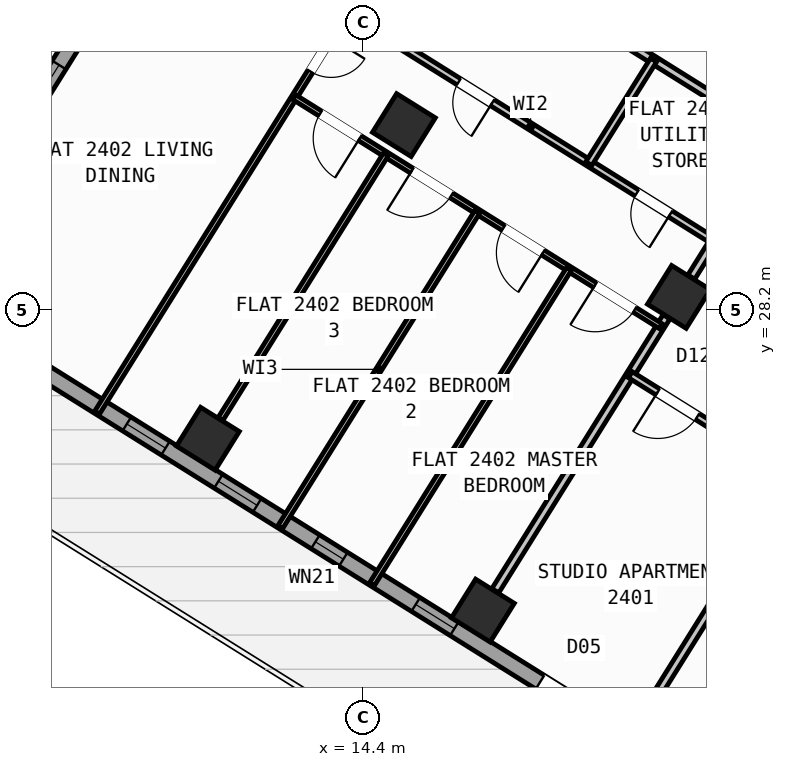
"""IFC4 building model, lengths in metres.
Left out: names, types, materials, properties, quantities, classifications, styles, units other than length and angle.
Written with IfcOpenShell. Run it as: python <this file> out.ifc"""

import sys

from ifc_helpers import new_model, si_unit, direction, frame, frame_2d, origin, origin_2d, place, context, subcontext, project, spatial, rectangle, hollow_rectangle, extrude, source, transform, mapped, element, fill, save


model = new_model("IFC4")
c1 = context("Model", 3, precision=1e-05, world=origin(), true_north=direction((0.0, 1.0)))
c2 = subcontext(c1, "Body", "Model", "MODEL_VIEW")
j1 = project(units=[si_unit("LENGTHUNIT", "METRE"), si_unit("PLANEANGLEUNIT", "RADIAN")], contexts=[c1])
p1 = place(None, origin())
s1 = spatial("IfcSite", under=j1, at=p1, CompositionType="ELEMENT")
p2 = place(p1, origin())
s2 = spatial("IfcBuilding", under=s1, at=p2, CompositionType="ELEMENT")
p3 = place(p2, frame((0.0, 0.0, 97.2)))
s3 = spatial("IfcBuildingStorey", under=s2, at=p3, CompositionType="ELEMENT", Elevation=97.2)
m1 = source(origin(), c2, "Body", "SweptSolid", [
    extrude(hollow_rectangle(XDim=0.9, YDim=0.9, WallThickness=0.036, at=origin_2d()), origin(), (0.0, 0.0, 1.0), 3.6),
])
for number, where, z_axis, x_axis in (
    (1, (20.632, 28.452, 0.0), (0.0, 0.0, 1.0), (-0.848, 0.53, 0.0)),
    (2, (16.764, 22.261, 0.0), (0.0, 0.0, 1.0), (-0.848, 0.53, 0.0)),
    (3, (15.205, 31.844, 0.0), (0.0, 0.0, 1.0), (-0.848, 0.53, 0.0)),
    (4, (11.336, 25.653, 0.0), (0.0, 0.0, 1.0), (-0.848, 0.53, 0.0)),
):
    element("IfcColumn", number, at=place(p3, frame(where, z_axis=z_axis, x_axis=x_axis)), inside=s3, PredefinedType="COLUMN", context=c2, shape_type="MappedRepresentation", body=[
        mapped(m1, transform((0.0, 0.0, 0.0), scale=1.0)),
    ])
p4 = place(p3, frame((31.76, 12.183, 0.0), z_axis=(0.0, 0.0, 1.0), x_axis=(-0.848047074256, 0.529920899612, 0.0)))
e5 = element("IfcWall", 5, at=p4, inside=s3, PredefinedType="STANDARD", context=c2, shape_type="SweptSolid", body=[
    extrude(rectangle(XDim=30.652, YDim=0.32, at=frame_2d((15.326, 0.0))), origin(), (0.0, 0.0, 1.0), 3.32),
])
p5 = place(p4, frame((15.153, 0.0, 0.0)))
e6 = element("IfcOpeningElement", 6, at=p5, cuts=e5, PredefinedType="OPENING", context=c2, shape_type="SweptSolid", body=[
    extrude(rectangle(XDim=1.2, YDim=2.15, at=frame_2d((0.6, 1.075))), frame((0.0, 0.17, 0.0), z_axis=(0.0, -1.0, 0.0), x_axis=(1.0, 0.0, 0.0)), (0.0, 0.0, 1.0), 0.34),
])
p6 = place(p4, frame((2.002, 0.0, 0.8)))
e7 = element("IfcOpeningElement", 7, at=p6, cuts=e5, PredefinedType="OPENING", context=c2, shape_type="SweptSolid", body=[
    extrude(rectangle(XDim=2.1, YDim=1.55, at=frame_2d((1.05, 0.775))), frame((0.0, 0.17, 0.0), z_axis=(0.0, -1.0, 0.0), x_axis=(1.0, 0.0, 0.0)), (0.0, 0.0, 1.0), 0.34),
])
p7 = place(p4, frame((7.206, 0.0, 0.8)))
e8 = element("IfcOpeningElement", 8, at=p7, cuts=e5, PredefinedType="OPENING", context=c2, shape_type="SweptSolid", body=[
    extrude(rectangle(XDim=2.1, YDim=1.55, at=frame_2d((1.05, 0.775))), frame((0.0, 0.17, 0.0), z_axis=(0.0, -1.0, 0.0), x_axis=(1.0, 0.0, 0.0)), (0.0, 0.0, 1.0), 0.34),
])
p8 = place(p4, frame((12.648, 0.0, 1.0)))
e9 = element("IfcOpeningElement", 9, at=p8, cuts=e5, PredefinedType="OPENING", context=c2, shape_type="SweptSolid", body=[
    extrude(rectangle(XDim=0.9, YDim=1.25, at=frame_2d((0.45, 0.625))), frame((0.0, 0.17, 0.0), z_axis=(0.0, -1.0, 0.0), x_axis=(1.0, 0.0, 0.0)), (0.0, 0.0, 1.0), 0.34),
])
p9 = place(p4, frame((27.974, 0.0, 0.95)))
e10 = element("IfcOpeningElement", 10, at=p9, cuts=e5, PredefinedType="OPENING", context=c2, shape_type="SweptSolid", body=[
    extrude(rectangle(XDim=1.2, YDim=1.4, at=frame_2d((0.6, 0.7))), frame((0.0, 0.17, 0.0), z_axis=(0.0, -1.0, 0.0), x_axis=(1.0, 0.0, 0.0)), (0.0, 0.0, 1.0), 0.34),
])
p10 = place(p4, frame((18.347, 0.0, 1.0)))
e11 = element("IfcOpeningElement", 11, at=p10, cuts=e5, PredefinedType="OPENING", context=c2, shape_type="SweptSolid", body=[
    extrude(rectangle(XDim=0.9, YDim=1.25, at=frame_2d((0.45, 0.625))), frame((0.0, 0.17, 0.0), z_axis=(0.0, -1.0, 0.0), x_axis=(1.0, 0.0, 0.0)), (0.0, 0.0, 1.0), 0.34),
])
p11 = place(p4, frame((20.931, 0.0, 1.0)))
e12 = element("IfcOpeningElement", 12, at=p11, cuts=e5, PredefinedType="OPENING", context=c2, shape_type="SweptSolid", body=[
    extrude(rectangle(XDim=0.65, YDim=1.15, at=frame_2d((0.325, 0.575))), frame((0.0, 0.17, 0.0), z_axis=(0.0, -1.0, 0.0), x_axis=(1.0, 0.0, 0.0)), (0.0, 0.0, 1.0), 0.34),
])
p12 = place(p4, frame((22.938, 0.0, 1.0)))
e13 = element("IfcOpeningElement", 13, at=p12, cuts=e5, PredefinedType="OPENING", context=c2, shape_type="SweptSolid", body=[
    extrude(rectangle(XDim=0.9, YDim=1.25, at=frame_2d((0.45, 0.625))), frame((0.0, 0.17, 0.0), z_axis=(0.0, -1.0, 0.0), x_axis=(1.0, 0.0, 0.0)), (0.0, 0.0, 1.0), 0.34),
])
p13 = place(p4, frame((25.069, 0.0, 1.0)))
e14 = element("IfcOpeningElement", 14, at=p13, cuts=e5, PredefinedType="OPENING", context=c2, shape_type="SweptSolid", body=[
    extrude(rectangle(XDim=0.9, YDim=1.25, at=frame_2d((0.45, 0.625))), frame((0.0, 0.17, 0.0), z_axis=(0.0, -1.0, 0.0), x_axis=(1.0, 0.0, 0.0)), (0.0, 0.0, 1.0), 0.34),
])
p14 = place(p3, frame((5.7, 28.71, 0.0), z_axis=(0.0, 0.0, 1.0), x_axis=(0.529923711467, 0.8480453172, 0.0)))
e15 = element("IfcWall", 15, at=p14, inside=s3, PredefinedType="STANDARD", context=c2, shape_type="SweptSolid", body=[
    extrude(rectangle(XDim=21.587, YDim=0.32, at=frame_2d((10.794, 0.0))), origin(), (0.0, 0.0, 1.0), 2.745),
])
p15 = place(p14, frame((2.994, 0.0, 0.8)))
e16 = element("IfcOpeningElement", 16, at=p15, cuts=e15, PredefinedType="OPENING", context=c2, shape_type="SweptSolid", body=[
    extrude(rectangle(XDim=2.1, YDim=1.55, at=frame_2d((1.05, 0.775))), frame((0.0, 0.17, 0.0), z_axis=(0.0, -1.0, 0.0), x_axis=(1.0, 0.0, 0.0)), (0.0, 0.0, 1.0), 0.34),
])
p16 = place(p14, frame((9.739, 0.0, 1.0)))
e17 = element("IfcOpeningElement", 17, at=p16, cuts=e15, PredefinedType="OPENING", context=c2, shape_type="SweptSolid", body=[
    extrude(rectangle(XDim=0.9, YDim=1.25, at=frame_2d((0.45, 0.625))), frame((0.0, 0.17, 0.0), z_axis=(0.0, -1.0, 0.0), x_axis=(1.0, 0.0, 0.0)), (0.0, 0.0, 1.0), 0.34),
])
p17 = place(p14, frame((18.639, 0.0, 0.85)))
e18 = element("IfcOpeningElement", 18, at=p17, cuts=e15, PredefinedType="OPENING", context=c2, shape_type="SweptSolid", body=[
    extrude(rectangle(XDim=1.5, YDim=1.5, at=frame_2d((0.75, 0.75))), frame((0.0, 0.17, 0.0), z_axis=(0.0, -1.0, 0.0), x_axis=(1.0, 0.0, 0.0)), (0.0, 0.0, 1.0), 0.34),
])
p18 = place(p3, frame((17.424, 47.083, 0.0), z_axis=(0.0, 0.0, 1.0), x_axis=(0.848049927979, -0.529916332693, 0.0)))
e19 = element("IfcWall", 19, at=p18, inside=s3, PredefinedType="STANDARD", context=c2, shape_type="SweptSolid", body=[
    extrude(rectangle(XDim=29.223, YDim=0.32, at=frame_2d((14.612, 0.0))), origin(), (0.0, 0.0, 1.0), 3.32),
])
p19 = place(p18, frame((3.745, 0.0, 0.0)))
e20 = element("IfcOpeningElement", 20, at=p19, cuts=e19, PredefinedType="OPENING", context=c2, shape_type="SweptSolid", body=[
    extrude(rectangle(XDim=1.05, YDim=2.15, at=frame_2d((0.525, 1.075))), frame((0.0, 0.17, 0.0), z_axis=(0.0, -1.0, 0.0), x_axis=(1.0, 0.0, 0.0)), (0.0, 0.0, 1.0), 0.34),
])
p20 = place(p18, frame((0.699, 0.0, 0.95)))
e21 = element("IfcOpeningElement", 21, at=p20, cuts=e19, PredefinedType="OPENING", context=c2, shape_type="SweptSolid", body=[
    extrude(rectangle(XDim=1.2, YDim=1.4, at=frame_2d((0.6, 0.7))), frame((0.0, 0.17, 0.0), z_axis=(0.0, -1.0, 0.0), x_axis=(1.0, 0.0, 0.0)), (0.0, 0.0, 1.0), 0.34),
])
p21 = place(p18, frame((6.951, 0.0, 1.0)))
e22 = element("IfcOpeningElement", 22, at=p21, cuts=e19, PredefinedType="OPENING", context=c2, shape_type="SweptSolid", body=[
    extrude(rectangle(XDim=0.9, YDim=1.25, at=frame_2d((0.45, 0.625))), frame((0.0, 0.17, 0.0), z_axis=(0.0, -1.0, 0.0), x_axis=(1.0, 0.0, 0.0)), (0.0, 0.0, 1.0), 0.34),
])
p22 = place(p18, frame((9.841, 0.0, 0.85)))
e23 = element("IfcOpeningElement", 23, at=p22, cuts=e19, PredefinedType="OPENING", context=c2, shape_type="SweptSolid", body=[
    extrude(rectangle(XDim=1.5, YDim=1.5, at=frame_2d((0.75, 0.75))), frame((0.0, 0.17, 0.0), z_axis=(0.0, -1.0, 0.0), x_axis=(1.0, 0.0, 0.0)), (0.0, 0.0, 1.0), 0.34),
])
p23 = place(p18, frame((13.889, 0.0, 0.95)))
e24 = element("IfcOpeningElement", 24, at=p23, cuts=e19, PredefinedType="OPENING", context=c2, shape_type="SweptSolid", body=[
    extrude(rectangle(XDim=1.2, YDim=1.4, at=frame_2d((0.6, 0.7))), frame((0.0, 0.17, 0.0), z_axis=(0.0, -1.0, 0.0), x_axis=(1.0, 0.0, 0.0)), (0.0, 0.0, 1.0), 0.34),
])
p24 = place(p18, frame((17.254, 0.0, 1.0)))
e25 = element("IfcOpeningElement", 25, at=p24, cuts=e19, PredefinedType="OPENING", context=c2, shape_type="SweptSolid", body=[
    extrude(rectangle(XDim=0.9, YDim=1.25, at=frame_2d((0.45, 0.625))), frame((0.0, 0.17, 0.0), z_axis=(0.0, -1.0, 0.0), x_axis=(1.0, 0.0, 0.0)), (0.0, 0.0, 1.0), 0.34),
])
p25 = place(p18, frame((20.764, 0.0, 0.8)))
e26 = element("IfcOpeningElement", 26, at=p25, cuts=e19, PredefinedType="OPENING", context=c2, shape_type="SweptSolid", body=[
    extrude(rectangle(XDim=2.1, YDim=1.55, at=frame_2d((1.05, 0.775))), frame((0.0, 0.17, 0.0), z_axis=(0.0, -1.0, 0.0), x_axis=(1.0, 0.0, 0.0)), (0.0, 0.0, 1.0), 0.34),
])
p26 = place(p18, frame((25.403, 0.0, 0.8)))
e27 = element("IfcOpeningElement", 27, at=p26, cuts=e19, PredefinedType="OPENING", context=c2, shape_type="SweptSolid", body=[
    extrude(rectangle(XDim=2.1, YDim=1.55, at=frame_2d((1.05, 0.775))), frame((0.0, 0.17, 0.0), z_axis=(0.0, -1.0, 0.0), x_axis=(1.0, 0.0, 0.0)), (0.0, 0.0, 1.0), 0.34),
])
p27 = place(p3, frame((25.807, 29.582, 0.0), z_axis=(0.0, 0.0, 1.0), x_axis=(-0.529920357077, -0.848047413271, 0.0)))
e28 = element("IfcWall", 28, at=p27, inside=s3, PredefinedType="PARTITIONING", context=c2, shape_type="SweptSolid", body=[
    extrude(rectangle(XDim=11.45, YDim=0.16, at=frame_2d((5.725, 0.0))), origin(), (0.0, 0.0, 1.0), 3.31),
])
p28 = place(p3, frame((26.973, 31.447, 0.0), z_axis=(0.0, 0.0, 1.0), x_axis=(-0.848048310262, 0.529918921593, 0.0)))
e29 = element("IfcWall", 29, at=p28, inside=s3, PredefinedType="PARTITIONING", context=c2, shape_type="SweptSolid", body=[
    extrude(rectangle(XDim=16.73, YDim=0.16, at=frame_2d((8.365, 0.0))), origin(), (0.0, 0.0, 1.0), 3.31),
])
p29 = place(p28, frame((2.22, 0.0, 0.0)))
e30 = element("IfcOpeningElement", 30, at=p29, cuts=e29, PredefinedType="OPENING", context=c2, shape_type="SweptSolid", body=[
    extrude(rectangle(XDim=0.86, YDim=2.05, at=frame_2d((0.43, 1.025))), frame((0.0, 0.09, 0.0), z_axis=(0.0, -1.0, 0.0), x_axis=(1.0, 0.0, 0.0)), (0.0, 0.0, 1.0), 0.18),
])
p30 = place(p28, frame((5.28, 0.0, 0.0)))
e31 = element("IfcOpeningElement", 31, at=p30, cuts=e29, PredefinedType="OPENING", context=c2, shape_type="SweptSolid", body=[
    extrude(rectangle(XDim=1.0, YDim=2.1, at=frame_2d((0.5, 1.05))), frame((0.0, 0.09, 0.0), z_axis=(0.0, -1.0, 0.0), x_axis=(1.0, 0.0, 0.0)), (0.0, 0.0, 1.0), 0.18),
])
p31 = place(p3, frame((25.807, 29.582, 0.0), z_axis=(0.0, 0.0, 1.0), x_axis=(-0.848052408131, 0.529912363569, 0.0)))
e32 = element("IfcWall", 32, at=p31, inside=s3, PredefinedType="PARTITIONING", context=c2, shape_type="SweptSolid", body=[
    extrude(rectangle(XDim=16.73, YDim=0.16, at=frame_2d((8.365, 0.0))), origin(), (0.0, 0.0, 1.0), 3.31),
])
p32 = place(p31, frame((2.22, 0.0, 0.0)))
e33 = element("IfcOpeningElement", 33, at=p32, cuts=e32, PredefinedType="OPENING", context=c2, shape_type="SweptSolid", body=[
    extrude(rectangle(XDim=0.86, YDim=2.05, at=frame_2d((0.43, 1.025))), frame((0.0, 0.09, 0.0), z_axis=(0.0, -1.0, 0.0), x_axis=(1.0, 0.0, 0.0)), (0.0, 0.0, 1.0), 0.18),
])
p33 = place(p31, frame((14.013, 0.0, 0.0)))
e34 = element("IfcOpeningElement", 34, at=p33, cuts=e32, PredefinedType="OPENING", context=c2, shape_type="SweptSolid", body=[
    extrude(rectangle(XDim=1.0, YDim=2.1, at=frame_2d((0.5, 1.05))), frame((0.0, 0.09, 0.0), z_axis=(0.0, -1.0, 0.0), x_axis=(1.0, 0.0, 0.0)), (0.0, 0.0, 1.0), 0.18),
])
p34 = place(p3, frame((22.593, 31.59, 0.0), z_axis=(0.0, 0.0, 1.0), x_axis=(-0.529924383291, -0.848044897393, 0.0)))
e35 = element("IfcWall", 35, at=p34, inside=s3, PredefinedType="PARTITIONING", context=c2, shape_type="SweptSolid", body=[
    extrude(rectangle(XDim=3.238, YDim=0.16, at=frame_2d((1.619, 0.0))), origin(), (0.0, 0.0, 1.0), 2.745),
])
p35 = place(p3, frame((20.387, 28.06, 0.0), z_axis=(0.0, 0.0, 1.0), x_axis=(-0.529902564924, -0.848058530814, 0.0)))
e36 = element("IfcWall", 36, at=p35, inside=s3, PredefinedType="PARTITIONING", context=c2, shape_type="SweptSolid", body=[
    extrude(rectangle(XDim=6.376, YDim=0.16, at=frame_2d((3.188, 0.0))), origin(), (0.0, 0.0, 1.0), 2.745),
])
p36 = place(p3, frame((22.887, 24.909, 0.0), z_axis=(0.0, 0.0, 1.0), x_axis=(-0.84803087207, 0.529946827537, 0.0)))
e37 = element("IfcWall", 37, at=p36, inside=s3, PredefinedType="PLUMBINGWALL", context=c2, shape_type="SweptSolid", body=[
    extrude(rectangle(XDim=3.79, YDim=0.14, at=frame_2d((1.895, 0.0))), origin(), (0.0, 0.0, 1.0), 3.31),
])
p37 = place(p36, frame((2.23, 0.0, 0.0)))
e38 = element("IfcOpeningElement", 38, at=p37, cuts=e37, PredefinedType="OPENING", context=c2, shape_type="SweptSolid", body=[
    extrude(rectangle(XDim=0.92, YDim=2.08, at=frame_2d((0.46, 1.04))), frame((0.0, 0.08, 0.0), z_axis=(0.0, -1.0, 0.0), x_axis=(1.0, 0.0, 0.0)), (0.0, 0.0, 1.0), 0.16),
])
p38 = place(p3, frame((15.361, 36.108, 0.0), z_axis=(0.0, 0.0, 1.0), x_axis=(-0.529912802348, -0.848052133956, 0.0)))
e39 = element("IfcWall", 39, at=p38, inside=s3, PredefinedType="PARTITIONING", context=c2, shape_type="SweptSolid", body=[
    extrude(rectangle(XDim=11.72, YDim=0.11, at=frame_2d((5.86, 0.0))), origin(), (0.0, 0.0, 1.0), 2.935),
])
p39 = place(p38, frame((3.0, 0.0, 0.0)))
e40 = element("IfcOpeningElement", 40, at=p39, cuts=e39, PredefinedType="OPENING", context=c2, shape_type="SweptSolid", body=[
    extrude(rectangle(XDim=0.78, YDim=2.05, at=frame_2d((0.39, 1.025))), frame((0.0, 0.065, 0.0), z_axis=(0.0, -1.0, 0.0), x_axis=(1.0, 0.0, 0.0)), (0.0, 0.0, 1.0), 0.13),
])
p40 = place(p3, frame((21.321, 29.554, 0.0), z_axis=(0.0, 0.0, 1.0), x_axis=(-0.84803529765, 0.529939745575, 0.0)))
e41 = element("IfcWall", 41, at=p40, inside=s3, PredefinedType="PLUMBINGWALL", context=c2, shape_type="SweptSolid", body=[
    extrude(rectangle(XDim=8.527, YDim=0.14, at=frame_2d((4.264, 0.0))), origin(), (0.0, 0.0, 1.0), 3.31),
])
p41 = place(p40, frame((5.155, 0.0, 0.0)))
e42 = element("IfcOpeningElement", 42, at=p41, cuts=e41, PredefinedType="OPENING", context=c2, shape_type="SweptSolid", body=[
    extrude(rectangle(XDim=0.78, YDim=2.05, at=frame_2d((0.39, 1.025))), frame((0.0, 0.08, 0.0), z_axis=(0.0, -1.0, 0.0), x_axis=(1.0, 0.0, 0.0)), (0.0, 0.0, 1.0), 0.16),
])
p42 = place(p40, frame((1.011, 0.0, 0.0)))
e43 = element("IfcOpeningElement", 43, at=p42, cuts=e41, PredefinedType="OPENING", context=c2, shape_type="SweptSolid", body=[
    extrude(rectangle(XDim=0.78, YDim=2.05, at=frame_2d((0.39, 1.025))), frame((0.0, 0.08, 0.0), z_axis=(0.0, -1.0, 0.0), x_axis=(1.0, 0.0, 0.0)), (0.0, 0.0, 1.0), 0.16),
])
p43 = place(p3, frame((20.132, 33.128, 0.0), z_axis=(0.0, 0.0, 1.0), x_axis=(-0.529935194983, -0.848038141311, 0.0)))
e44 = element("IfcWall", 44, at=p43, inside=s3, PredefinedType="PLUMBINGWALL", context=c2, shape_type="SweptSolid", body=[
    extrude(rectangle(XDim=2.41, YDim=0.14, at=frame_2d((1.205, 0.0))), origin(), (0.0, 0.0, 1.0), 3.31),
])
p44 = place(p3, frame((20.272, 27.875, 0.0), z_axis=(0.0, 0.0, 1.0), x_axis=(-0.848056204746, 0.529906287557, 0.0)))
e45 = element("IfcWall", 45, at=p44, inside=s3, PredefinedType="PARTITIONING", context=c2, shape_type="SweptSolid", body=[
    extrude(rectangle(XDim=8.527, YDim=0.11, at=frame_2d((4.264, 0.0))), origin(), (0.0, 0.0, 1.0), 3.31),
])
p45 = place(p44, frame((0.606, 0.0, 0.0)))
e46 = element("IfcOpeningElement", 46, at=p45, cuts=e45, PredefinedType="OPENING", context=c2, shape_type="SweptSolid", body=[
    extrude(rectangle(XDim=0.92, YDim=2.08, at=frame_2d((0.46, 1.04))), frame((0.0, 0.065, 0.0), z_axis=(0.0, -1.0, 0.0), x_axis=(1.0, 0.0, 0.0)), (0.0, 0.0, 1.0), 0.13),
])
p46 = place(p44, frame((2.738, 0.0, 0.0)))
e47 = element("IfcOpeningElement", 47, at=p46, cuts=e45, PredefinedType="OPENING", context=c2, shape_type="SweptSolid", body=[
    extrude(rectangle(XDim=0.92, YDim=2.08, at=frame_2d((0.46, 1.04))), frame((0.0, 0.065, 0.0), z_axis=(0.0, -1.0, 0.0), x_axis=(1.0, 0.0, 0.0)), (0.0, 0.0, 1.0), 0.13),
])
p47 = place(p44, frame((4.869, 0.0, 0.0)))
e48 = element("IfcOpeningElement", 48, at=p47, cuts=e45, PredefinedType="OPENING", context=c2, shape_type="SweptSolid", body=[
    extrude(rectangle(XDim=0.92, YDim=2.08, at=frame_2d((0.46, 1.04))), frame((0.0, 0.065, 0.0), z_axis=(0.0, -1.0, 0.0), x_axis=(1.0, 0.0, 0.0)), (0.0, 0.0, 1.0), 0.13),
])
p48 = place(p44, frame((7.001, 0.0, 0.0)))
e49 = element("IfcOpeningElement", 49, at=p48, cuts=e45, PredefinedType="OPENING", context=c2, shape_type="SweptSolid", body=[
    extrude(rectangle(XDim=0.92, YDim=2.08, at=frame_2d((0.46, 1.04))), frame((0.0, 0.065, 0.0), z_axis=(0.0, -1.0, 0.0), x_axis=(1.0, 0.0, 0.0)), (0.0, 0.0, 1.0), 0.13),
])
for number, where, z_axis, x_axis in (
    (50, (18.464, 29.005, 0.0), (0.0, 0.0, 1.0), (-0.53, -0.848, 0.0)),
    (51, (16.656, 30.135, 0.0), (0.0, 0.0, 1.0), (-0.53, -0.848, 0.0)),
):
    element("IfcWall", number, at=place(p3, frame(where, z_axis=z_axis, x_axis=x_axis)), inside=s3, PredefinedType="PARTITIONING", context=c2, shape_type="SweptSolid", body=[
        extrude(rectangle(XDim=7.34, YDim=0.11, at=frame_2d((3.67, 0.0))), origin(), (0.0, 0.0, 1.0), 2.935),
    ])
p49 = place(p3, frame((14.848, 31.264, 0.0), z_axis=(0.0, 0.0, 1.0), x_axis=(-0.529920534869, -0.848047302174, 0.0)))
e52 = element("IfcWall", 52, at=p49, inside=s3, PredefinedType="PARTITIONING", context=c2, shape_type="SweptSolid", body=[
    extrude(rectangle(XDim=6.158, YDim=0.11, at=frame_2d((3.079, 0.0))), origin(), (0.0, 0.0, 1.0), 2.745),
])
m2 = source(origin(), c2, "Body", "SweptSolid", [
    extrude(rectangle(XDim=1.2, YDim=2.15, at=frame_2d((0.6, 1.075))), frame((0.0, 0.025, 0.0), z_axis=(0.0, -1.0, 0.0), x_axis=(1.0, 0.0, 0.0)), (0.0, 0.0, 1.0), 0.05),
])
p50 = place(p5, origin())
e53 = element("IfcDoor", 53, at=p50, inside=s3, OperationType="SINGLE_SWING_LEFT", PredefinedType="DOOR", context=c2, shape_type="MappedRepresentation", body=[
    mapped(m2, transform((0.0, 0.0, 0.0), scale=1.0)),
])
fill(e6, e53)
m3 = source(origin(), c2, "Body", "SweptSolid", [
    extrude(rectangle(XDim=2.1, YDim=1.55, at=frame_2d((1.05, 0.775))), frame((0.0, 0.03, 0.0), z_axis=(0.0, -1.0, 0.0), x_axis=(1.0, 0.0, 0.0)), (0.0, 0.0, 1.0), 0.06),
])
p51 = place(p15, origin())
e54 = element("IfcWindow", 54, at=p51, inside=s3, PartitioningType="SINGLE_PANEL", PredefinedType="WINDOW", context=c2, shape_type="MappedRepresentation", body=[
    mapped(m3, transform((0.0, 0.0, 0.0), scale=1.0)),
])
fill(e16, e54)
m4 = source(origin(), c2, "Body", "SweptSolid", [
    extrude(rectangle(XDim=0.9, YDim=1.25, at=frame_2d((0.45, 0.625))), frame((0.0, 0.03, 0.0), z_axis=(0.0, -1.0, 0.0), x_axis=(1.0, 0.0, 0.0)), (0.0, 0.0, 1.0), 0.06),
])
p52 = place(p10, origin())
e55 = element("IfcWindow", 55, at=p52, inside=s3, PartitioningType="SINGLE_PANEL", PredefinedType="WINDOW", context=c2, shape_type="MappedRepresentation", body=[
    mapped(m4, transform((0.0, 0.0, 0.0), scale=1.0)),
])
fill(e11, e55)
m5 = source(origin(), c2, "Body", "SweptSolid", [
    extrude(rectangle(XDim=0.65, YDim=1.15, at=frame_2d((0.325, 0.575))), frame((0.0, 0.03, 0.0), z_axis=(0.0, -1.0, 0.0), x_axis=(1.0, 0.0, 0.0)), (0.0, 0.0, 1.0), 0.06),
])
p53 = place(p11, origin())
e56 = element("IfcWindow", 56, at=p53, inside=s3, PartitioningType="SINGLE_PANEL", PredefinedType="WINDOW", context=c2, shape_type="MappedRepresentation", body=[
    mapped(m5, transform((0.0, 0.0, 0.0), scale=1.0)),
])
fill(e12, e56)
p54 = place(p12, origin())
e57 = element("IfcWindow", 57, at=p54, inside=s3, PartitioningType="SINGLE_PANEL", PredefinedType="WINDOW", context=c2, shape_type="MappedRepresentation", body=[
    mapped(m4, transform((0.0, 0.0, 0.0), scale=1.0)),
])
fill(e13, e57)
p55 = place(p13, origin())
e58 = element("IfcWindow", 58, at=p55, inside=s3, PartitioningType="SINGLE_PANEL", PredefinedType="WINDOW", context=c2, shape_type="MappedRepresentation", body=[
    mapped(m4, transform((0.0, 0.0, 0.0), scale=1.0)),
])
fill(e14, e58)
m6 = source(origin(), c2, "Body", "SweptSolid", [
    extrude(rectangle(XDim=0.92, YDim=2.08, at=frame_2d((0.46, 1.04))), frame((0.0, 0.025, 0.0), z_axis=(0.0, -1.0, 0.0), x_axis=(1.0, 0.0, 0.0)), (0.0, 0.0, 1.0), 0.05),
])
p56 = place(p37, origin())
e59 = element("IfcDoor", 59, at=p56, inside=s3, OperationType="SINGLE_SWING_RIGHT", PredefinedType="DOOR", context=c2, shape_type="MappedRepresentation", body=[
    mapped(m6, transform((0.0, 0.0, 0.0), scale=1.0)),
])
fill(e38, e59)
m7 = source(origin(), c2, "Body", "SweptSolid", [
    extrude(rectangle(XDim=0.78, YDim=2.05, at=frame_2d((0.39, 1.025))), frame((0.0, 0.025, 0.0), z_axis=(0.0, -1.0, 0.0), x_axis=(1.0, 0.0, 0.0)), (0.0, 0.0, 1.0), 0.05),
])
p57 = place(p39, origin())
e60 = element("IfcDoor", 60, at=p57, inside=s3, OperationType="SINGLE_SWING_LEFT", PredefinedType="DOOR", context=c2, shape_type="MappedRepresentation", body=[
    mapped(m7, transform((0.0, 0.0, 0.0), scale=1.0)),
])
fill(e40, e60)
p58 = place(p41, origin())
e61 = element("IfcDoor", 61, at=p58, inside=s3, OperationType="SINGLE_SWING_LEFT", PredefinedType="DOOR", context=c2, shape_type="MappedRepresentation", body=[
    mapped(m7, transform((0.0, 0.0, 0.0), scale=1.0)),
])
fill(e42, e61)
p59 = place(p42, origin())
e62 = element("IfcDoor", 62, at=p59, inside=s3, OperationType="SINGLE_SWING_LEFT", PredefinedType="DOOR", context=c2, shape_type="MappedRepresentation", body=[
    mapped(m7, transform((0.0, 0.0, 0.0), scale=1.0)),
])
fill(e43, e62)
p60 = place(p45, origin())
e63 = element("IfcDoor", 63, at=p60, inside=s3, OperationType="SINGLE_SWING_RIGHT", PredefinedType="DOOR", context=c2, shape_type="MappedRepresentation", body=[
    mapped(m6, transform((0.0, 0.0, 0.0), scale=1.0)),
])
fill(e46, e63)
p61 = place(p46, origin())
e64 = element("IfcDoor", 64, at=p61, inside=s3, OperationType="SINGLE_SWING_LEFT", PredefinedType="DOOR", context=c2, shape_type="MappedRepresentation", body=[
    mapped(m6, transform((0.0, 0.0, 0.0), scale=1.0)),
])
fill(e47, e64)
p62 = place(p47, origin())
e65 = element("IfcDoor", 65, at=p62, inside=s3, OperationType="SINGLE_SWING_RIGHT", PredefinedType="DOOR", context=c2, shape_type="MappedRepresentation", body=[
    mapped(m6, transform((0.0, 0.0, 0.0), scale=1.0)),
])
fill(e48, e65)
p63 = place(p48, origin())
e66 = element("IfcDoor", 66, at=p63, inside=s3, OperationType="SINGLE_SWING_LEFT", PredefinedType="DOOR", context=c2, shape_type="MappedRepresentation", body=[
    mapped(m6, transform((0.0, 0.0, 0.0), scale=1.0)),
])
fill(e49, e66)
save(model, sys.argv[1])
